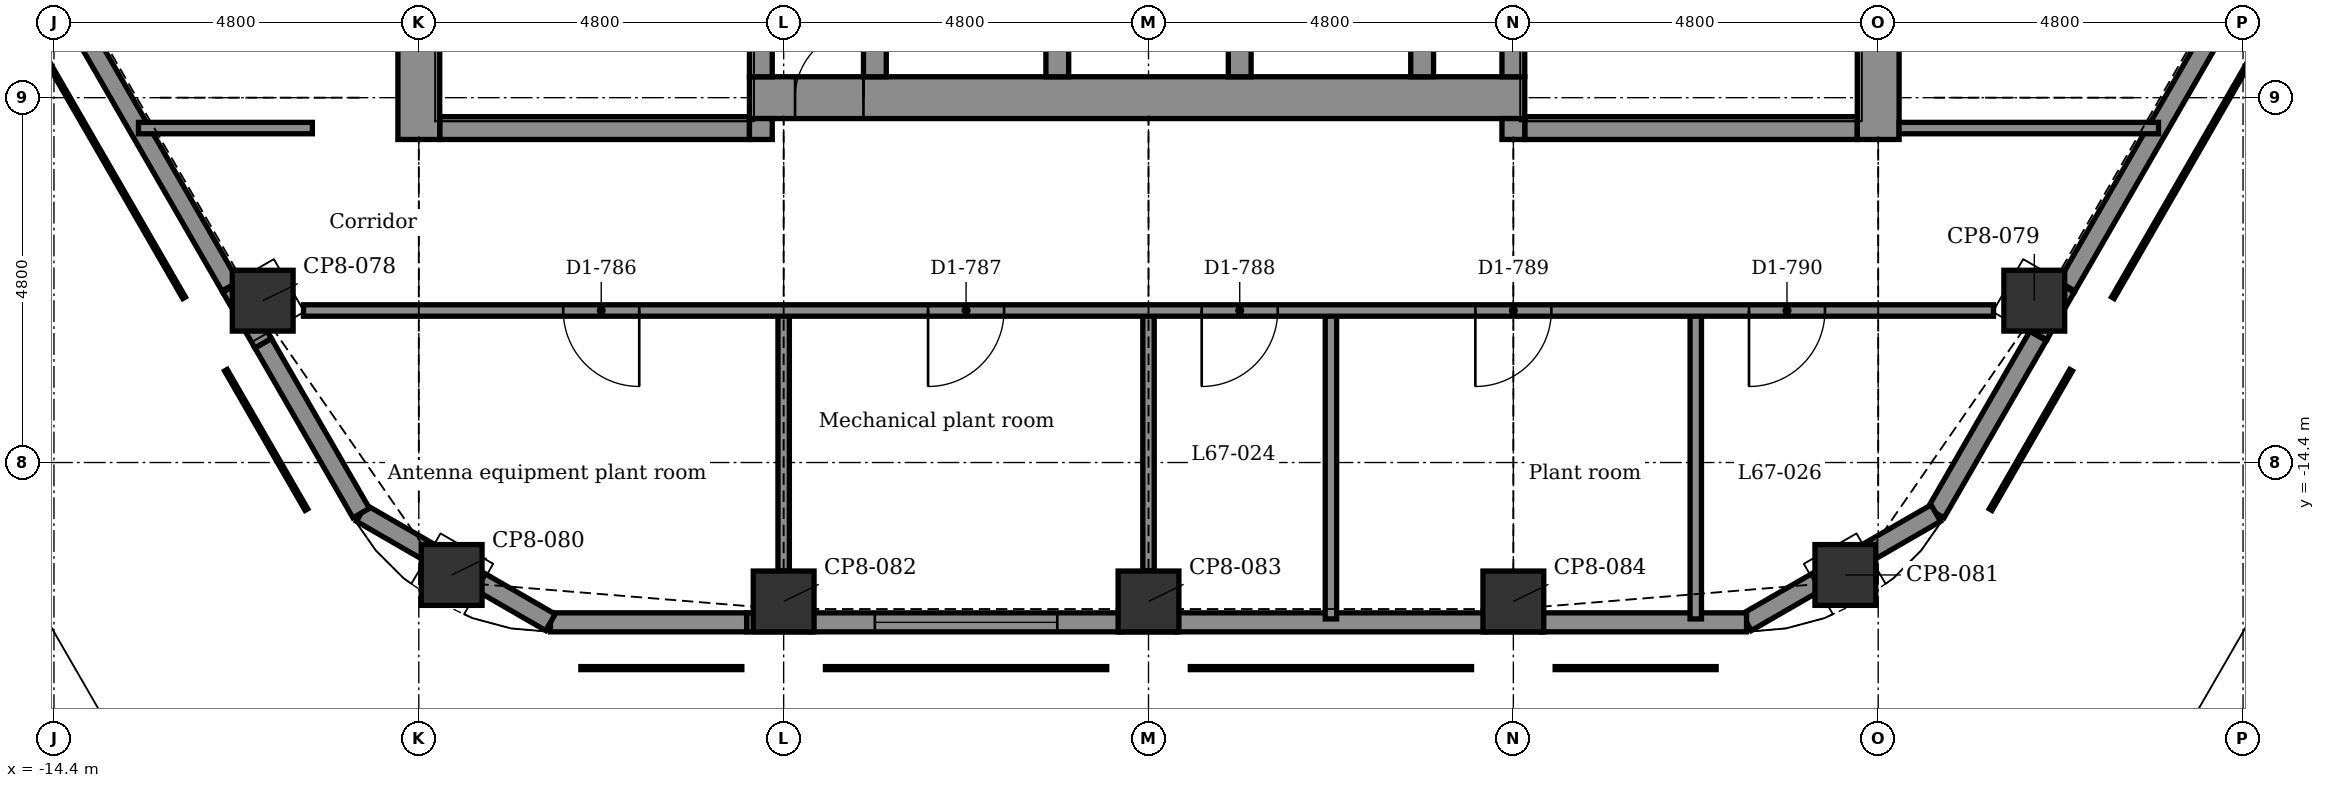
"""IFC4 building model, lengths in metres.
Left out: names, types, materials, properties, quantities, classifications, styles, units other than length and angle.
Written with IfcOpenShell. Run it as: python <this file> out.ifc"""

import sys

from ifc_helpers import new_model, si_unit, direction, frame, frame_2d, origin, origin_2d, place, context, subcontext, project, spatial, rectangle, extrude, element, fill, save


model = new_model("IFC4")
c1 = context("Model", 3, precision=1e-05, world=origin(), true_north=direction((0.0, 1.0)))
c2 = subcontext(c1, "Body", "Model", "MODEL_VIEW")
j1 = project(units=[si_unit("LENGTHUNIT", "METRE"), si_unit("PLANEANGLEUNIT", "RADIAN")], contexts=[c1])
p1 = place(None, origin())
s1 = spatial("IfcSite", under=j1, at=p1, CompositionType="ELEMENT")
p2 = place(p1, origin())
s2 = spatial("IfcBuilding", under=s1, at=p2, CompositionType="ELEMENT")
p3 = place(p2, frame((0.0, 0.0, 296.9)))
s3 = spatial("IfcBuildingStorey", under=s2, at=p3, CompositionType="ELEMENT", Elevation=296.9)
for number, where, z_axis, x_axis in (
    (1, (11.654, -12.271, -0.3), (0.0, 0.0, 1.0), (0.5, 0.866, 0.0)),
    (2, (9.168, -15.879, -0.3), (0.0, 0.0, 1.0), (0.866, 0.5, 0.0)),
    (3, (4.8, -16.228, -0.3), (0.0, 0.0, 1.0), (1.0, 0.0, 0.0)),
    (4, (0.0, -16.228, -0.3), (0.0, 0.0, 1.0), (1.0, 0.0, 0.0)),
    (5, (-4.8, -16.228, -0.3), (0.0, 0.0, 1.0), (1.0, 0.0, 0.0)),
    (6, (-9.168, -15.879, -0.3), (0.0, 0.0, 1.0), (0.5, 0.866, 0.0)),
    (7, (-11.654, -12.271, -0.3), (0.0, 0.0, 1.0), (0.866, 0.5, 0.0)),
):
    element("IfcColumn", number, at=place(p3, frame(where, z_axis=z_axis, x_axis=x_axis)), inside=s3, PredefinedType="COLUMN", context=c2, shape_type="SweptSolid", body=[
        extrude(rectangle(XDim=0.8, YDim=0.8, at=origin_2d()), origin(), (0.0, 0.0, 1.0), 5.0),
    ])
p4 = place(p3, frame((-9.325, -10.0, -0.3), z_axis=(0.0, 0.0, 1.0), x_axis=(1.0, 0.0, 0.0)))
e8 = element("IfcWall", 8, at=p4, inside=s3, PredefinedType="STANDARD", context=c2, shape_type="SweptSolid", body=[
    extrude(rectangle(XDim=4.075, YDim=0.3, at=frame_2d((2.038, 0.0))), origin(), (0.0, 0.0, 1.0), 5.0),
])
p5 = place(p3, frame((4.95, -10.0, -0.3), z_axis=(0.0, 0.0, 1.0), x_axis=(1.0, 0.0, 0.0)))
e9 = element("IfcWall", 9, at=p5, inside=s3, PredefinedType="STANDARD", context=c2, shape_type="SweptSolid", body=[
    extrude(rectangle(XDim=4.375, YDim=0.3, at=frame_2d((2.188, 0.0))), origin(), (0.0, 0.0, 1.0), 5.0),
])
p6 = place(p3, frame((-5.25, -9.6, -0.3), z_axis=(0.0, 0.0, 1.0), x_axis=(1.0, 0.0, 0.0)))
e10 = element("IfcWall", 10, at=p6, inside=s3, PredefinedType="SHEAR", context=c2, shape_type="SweptSolid", body=[
    extrude(rectangle(XDim=10.2, YDim=0.55, at=frame_2d((5.1, 0.0))), origin(), (0.0, 0.0, 1.0), 5.0),
])
p7 = place(p6, frame((0.6, 0.0, 0.3)))
e11 = element("IfcOpeningElement", 11, at=p7, cuts=e10, PredefinedType="OPENING", context=c2, shape_type="SweptSolid", body=[
    extrude(rectangle(XDim=0.9, YDim=2.1, at=frame_2d((0.45, 1.05))), frame((0.0, 0.285, 0.0), z_axis=(0.0, -1.0, 0.0), x_axis=(1.0, 0.0, 0.0)), (0.0, 0.0, 1.0), 0.57),
])
p8 = place(p3, frame((-9.6, -10.15, -0.3), z_axis=(0.0, 0.0, 1.0), x_axis=(0.0, 1.0, 0.0)))
e12 = element("IfcWall", 12, at=p8, inside=s3, PredefinedType="SHEAR", context=c2, shape_type="SweptSolid", body=[
    extrude(rectangle(XDim=7.6, YDim=0.55, at=frame_2d((3.8, 0.0))), origin(), (0.0, 0.0, 1.0), 5.0),
])
p9 = place(p3, frame((-5.1, -10.15, -0.3), z_axis=(0.0, 0.0, 1.0), x_axis=(0.0, 1.0, 0.0)))
e13 = element("IfcWall", 13, at=p9, inside=s3, PredefinedType="STANDARD", context=c2, shape_type="SweptSolid", body=[
    extrude(rectangle(XDim=0.275, YDim=0.3, at=frame_2d((0.137, 0.0))), origin(), (0.0, 0.0, 1.0), 5.0),
])
p10 = place(p3, frame((-5.1, -9.325, -0.3), z_axis=(0.0, 0.0, 1.0), x_axis=(0.0, 1.0, 0.0)))
e14 = element("IfcWall", 14, at=p10, inside=s3, PredefinedType="STANDARD", context=c2, shape_type="SweptSolid", body=[
    extrude(rectangle(XDim=7.075, YDim=0.3, at=frame_2d((3.538, 0.0))), origin(), (0.0, 0.0, 1.0), 5.0),
])
p11 = place(p10, frame((3.875, 0.0, 0.3)))
e15 = element("IfcOpeningElement", 15, at=p11, cuts=e14, PredefinedType="OPENING", context=c2, shape_type="SweptSolid", body=[
    extrude(rectangle(XDim=1.2, YDim=2.1, at=frame_2d((0.6, 1.05))), frame((0.0, 0.16, 0.0), z_axis=(0.0, -1.0, 0.0), x_axis=(1.0, 0.0, 0.0)), (0.0, 0.0, 1.0), 0.32),
])
for number, where, z_axis, x_axis in (
    (16, (-3.6, -9.325, -0.3), (0.0, 0.0, 1.0), (0.0, 1.0, 0.0)),
    (17, (-1.2, -9.325, -0.3), (0.0, 0.0, 1.0), (0.0, 1.0, 0.0)),
    (18, (1.2, -9.325, -0.3), (0.0, 0.0, 1.0), (0.0, 1.0, 0.0)),
    (19, (3.6, -9.325, -0.3), (0.0, 0.0, 1.0), (0.0, 1.0, 0.0)),
):
    element("IfcWall", number, at=place(p3, frame(where, z_axis=z_axis, x_axis=x_axis)), inside=s3, PredefinedType="STANDARD", context=c2, shape_type="SweptSolid", body=[
        extrude(rectangle(XDim=3.475, YDim=0.3, at=frame_2d((1.737, 0.0))), origin(), (0.0, 0.0, 1.0), 0.8),
    ])
p12 = place(p3, frame((4.8, -10.15, -0.3), z_axis=(0.0, 0.0, 1.0), x_axis=(0.0, 1.0, 0.0)))
e20 = element("IfcWall", 20, at=p12, inside=s3, PredefinedType="STANDARD", context=c2, shape_type="SweptSolid", body=[
    extrude(rectangle(XDim=0.275, YDim=0.3, at=frame_2d((0.137, 0.0))), origin(), (0.0, 0.0, 1.0), 5.0),
])
p13 = place(p3, frame((4.8, -9.325, -0.3), z_axis=(0.0, 0.0, 1.0), x_axis=(0.0, 1.0, 0.0)))
e21 = element("IfcWall", 21, at=p13, inside=s3, PredefinedType="STANDARD", context=c2, shape_type="SweptSolid", body=[
    extrude(rectangle(XDim=7.075, YDim=0.3, at=frame_2d((3.538, 0.0))), origin(), (0.0, 0.0, 1.0), 5.0),
])
p14 = place(p13, frame((3.875, 0.0, 0.3)))
e22 = element("IfcOpeningElement", 22, at=p14, cuts=e21, PredefinedType="OPENING", context=c2, shape_type="SweptSolid", body=[
    extrude(rectangle(XDim=1.2, YDim=2.1, at=frame_2d((0.6, 1.05))), frame((0.0, 0.16, 0.0), z_axis=(0.0, -1.0, 0.0), x_axis=(1.0, 0.0, 0.0)), (0.0, 0.0, 1.0), 0.32),
])
p15 = place(p3, frame((9.6, -10.15, -0.3), z_axis=(0.0, 0.0, 1.0), x_axis=(0.0, 1.0, 0.0)))
e23 = element("IfcWall", 23, at=p15, inside=s3, PredefinedType="SHEAR", context=c2, shape_type="SweptSolid", body=[
    extrude(rectangle(XDim=20.075, YDim=0.55, at=frame_2d((10.038, 0.0))), origin(), (0.0, 0.0, 1.0), 5.0),
])
p16 = place(p3, frame((14.112, -8.563, 0.0), z_axis=(0.0, 0.0, 1.0), x_axis=(-0.500026340207, -0.866010195725, 0.0)))
e24 = element("IfcWall", 24, at=p16, inside=s3, PredefinedType="SOLIDWALL", context=c2, shape_type="SweptSolid", body=[
    extrude(rectangle(XDim=4.08, YDim=0.25, at=frame_2d((2.04, 0.0))), origin(), (0.0, 0.0, 1.0), 3.8),
])
p17 = place(p3, frame((12.072, -12.096, 0.0), z_axis=(0.0, 0.0, 1.0), x_axis=(-0.499896944627, -0.866084894657, 0.0)))
e25 = element("IfcWall", 25, at=p17, inside=s3, PredefinedType="SOLIDWALL", context=c2, shape_type="SweptSolid", body=[
    extrude(rectangle(XDim=0.727, YDim=0.25, at=frame_2d((0.363, 0.0))), origin(), (0.0, 0.0, 1.0), 4.7),
])
p18 = place(p3, frame((11.708, -12.726, 0.0), z_axis=(0.0, 0.0, 1.0), x_axis=(-0.500056239725, -0.865992931329, 0.0)))
e26 = element("IfcWall", 26, at=p18, inside=s3, PredefinedType="SOLIDWALL", context=c2, shape_type="SweptSolid", body=[
    extrude(rectangle(XDim=2.701, YDim=0.25, at=frame_2d((1.351, 0.0))), origin(), (0.0, 0.0, 1.0), 3.8),
])
p19 = place(p3, frame((10.358, -15.065, 0.0), z_axis=(0.0, 0.0, 1.0), x_axis=(-0.866018712932, -0.500011588718, 0.0)))
e27 = element("IfcWall", 27, at=p19, inside=s3, PredefinedType="SOLIDWALL", context=c2, shape_type="SweptSolid", body=[
    extrude(rectangle(XDim=2.875, YDim=0.25, at=frame_2d((1.438, 0.0))), origin(), (0.0, 0.0, 1.0), 4.7),
])
p20 = place(p3, frame((-0.36, -16.503, 0.0), z_axis=(0.0, 0.0, 1.0), x_axis=(-1.0, 0.0, 0.0)))
e28 = element("IfcWall", 28, at=p20, inside=s3, PredefinedType="SOLIDWALL", context=c2, shape_type="SweptSolid", body=[
    extrude(rectangle(XDim=4.08, YDim=0.25, at=frame_2d((2.04, 0.0))), origin(), (0.0, 0.0, 1.0), 3.8),
])
p21 = place(p20, frame((0.84, 0.0, 0.6)))
e29 = element("IfcOpeningElement", 29, at=p21, cuts=e28, PredefinedType="OPENING", context=c2, shape_type="SweptSolid", body=[
    extrude(rectangle(XDim=2.4, YDim=3.0, at=frame_2d((1.2, 1.5))), frame((0.0, 0.135, 0.0), z_axis=(0.0, -1.0, 0.0), x_axis=(1.0, 0.0, 0.0)), (0.0, 0.0, 1.0), 0.27),
])
p22 = place(p3, frame((7.868, -16.503, 0.0), z_axis=(0.0, 0.0, 1.0), x_axis=(-1.0, 0.0, 0.0)))
e30 = element("IfcWall", 30, at=p22, inside=s3, PredefinedType="SOLIDWALL", context=c2, shape_type="SweptSolid", body=[
    extrude(rectangle(XDim=2.701, YDim=0.25, at=frame_2d((1.351, 0.0))), origin(), (0.0, 0.0, 1.0), 3.8),
])
p23 = place(p3, frame((5.167, -16.503, 0.0), z_axis=(0.0, 0.0, 1.0), x_axis=(-1.0, 0.0, 0.0)))
e31 = element("IfcWall", 31, at=p23, inside=s3, PredefinedType="SOLIDWALL", context=c2, shape_type="SweptSolid", body=[
    extrude(rectangle(XDim=0.727, YDim=0.25, at=frame_2d((0.363, 0.0))), origin(), (0.0, 0.0, 1.0), 4.7),
])
p24 = place(p3, frame((4.44, -16.503, 0.0), z_axis=(0.0, 0.0, 1.0), x_axis=(-1.0, 0.0, 0.0)))
e32 = element("IfcWall", 32, at=p24, inside=s3, PredefinedType="SOLIDWALL", context=c2, shape_type="SweptSolid", body=[
    extrude(rectangle(XDim=4.08, YDim=0.25, at=frame_2d((2.04, 0.0))), origin(), (0.0, 0.0, 1.0), 3.8),
])
p25 = place(p3, frame((0.36, -16.503, 0.0), z_axis=(0.0, 0.0, 1.0), x_axis=(-1.0, 0.0, 0.0)))
e33 = element("IfcWall", 33, at=p25, inside=s3, PredefinedType="SOLIDWALL", context=c2, shape_type="SweptSolid", body=[
    extrude(rectangle(XDim=0.72, YDim=0.25, at=frame_2d((0.36, 0.0))), origin(), (0.0, 0.0, 1.0), 4.7),
])
p26 = place(p3, frame((-4.44, -16.503, 0.0), z_axis=(0.0, 0.0, 1.0), x_axis=(-1.0, 0.0, 0.0)))
e34 = element("IfcWall", 34, at=p26, inside=s3, PredefinedType="SOLIDWALL", context=c2, shape_type="SweptSolid", body=[
    extrude(rectangle(XDim=0.847, YDim=0.25, at=frame_2d((0.424, 0.0))), origin(), (0.0, 0.0, 1.0), 4.7),
])
p27 = place(p3, frame((-5.287, -16.503, 0.0), z_axis=(0.0, 0.0, 1.0), x_axis=(-1.0, 0.0, 0.0)))
e35 = element("IfcWall", 35, at=p27, inside=s3, PredefinedType="SOLIDWALL", context=c2, shape_type="SweptSolid", body=[
    extrude(rectangle(XDim=2.581, YDim=0.25, at=frame_2d((1.291, 0.0))), origin(), (0.0, 0.0, 1.0), 3.8),
])
p28 = place(p3, frame((-7.868, -16.503, 0.0), z_axis=(0.0, 0.0, 1.0), x_axis=(-0.866018712932, 0.500011588718, 0.0)))
e36 = element("IfcWall", 36, at=p28, inside=s3, PredefinedType="SOLIDWALL", context=c2, shape_type="SweptSolid", body=[
    extrude(rectangle(XDim=2.875, YDim=0.25, at=frame_2d((1.438, 0.0))), origin(), (0.0, 0.0, 1.0), 4.7),
])
p29 = place(p3, frame((-10.358, -15.065, 0.0), z_axis=(0.0, 0.0, 1.0), x_axis=(-0.500025418611, 0.866010727845, 0.0)))
e37 = element("IfcWall", 37, at=p29, inside=s3, PredefinedType="SOLIDWALL", context=c2, shape_type="SweptSolid", body=[
    extrude(rectangle(XDim=2.581, YDim=0.25, at=frame_2d((1.291, 0.0))), origin(), (0.0, 0.0, 1.0), 3.8),
])
p30 = place(p3, frame((-11.648, -12.83, 0.0), z_axis=(0.0, 0.0, 1.0), x_axis=(-0.500013496215, 0.866017611601, 0.0)))
e38 = element("IfcWall", 38, at=p30, inside=s3, PredefinedType="SOLIDWALL", context=c2, shape_type="SweptSolid", body=[
    extrude(rectangle(XDim=0.847, YDim=0.25, at=frame_2d((0.424, 0.0))), origin(), (0.0, 0.0, 1.0), 4.7),
])
p31 = place(p3, frame((-12.072, -12.096, 0.0), z_axis=(0.0, 0.0, 1.0), x_axis=(-0.500026340207, 0.866010195725, 0.0)))
e39 = element("IfcWall", 39, at=p31, inside=s3, PredefinedType="SOLIDWALL", context=c2, shape_type="SweptSolid", body=[
    extrude(rectangle(XDim=4.08, YDim=0.25, at=frame_2d((2.04, 0.0))), origin(), (0.0, 0.0, 1.0), 3.8),
])
for number, where, z_axis, x_axis in (
    (40, (7.2, -16.458, 0.0), (0.0, 0.0, 1.0), (0.0, 1.0, 0.0)),
    (41, (2.4, -16.458, 0.0), (0.0, 0.0, 1.0), (0.0, 1.0, 0.0)),
):
    element("IfcWall", number, at=place(p3, frame(where, z_axis=z_axis, x_axis=x_axis)), inside=s3, PredefinedType="PARTITIONING", context=c2, shape_type="SweptSolid", body=[
        extrude(rectangle(XDim=4.058, YDim=0.15, at=frame_2d((2.029, 0.0))), origin(), (0.0, 0.0, 1.0), 4.7),
    ])
for number, where, z_axis, x_axis in (
    (42, (0.0, -15.828, 0.0), (0.0, 0.0, 1.0), (0.0, 1.0, 0.0)),
    (43, (-4.8, -15.828, 0.0), (0.0, 0.0, 1.0), (0.0, 1.0, 0.0)),
):
    element("IfcWall", number, at=place(p3, frame(where, z_axis=z_axis, x_axis=x_axis)), inside=s3, PredefinedType="PARTITIONING", context=c2, shape_type="SweptSolid", body=[
        extrude(rectangle(XDim=3.428, YDim=0.15, at=frame_2d((1.714, 0.0))), origin(), (0.0, 0.0, 1.0), 4.39),
    ])
p32 = place(p3, frame((-11.117, -12.4, 0.0), z_axis=(0.0, 0.0, 1.0), x_axis=(1.0, 0.0, 0.0)))
e44 = element("IfcWall", 44, at=p32, inside=s3, PredefinedType="PARTITIONING", context=c2, shape_type="SweptSolid", body=[
    extrude(rectangle(XDim=22.234, YDim=0.15, at=frame_2d((11.117, 0.0))), origin(), (0.0, 0.0, 1.0), 4.7),
])
p33 = place(p32, frame((3.417, 0.0, 0.0)))
e45 = element("IfcOpeningElement", 45, at=p33, cuts=e44, PredefinedType="OPENING", context=c2, shape_type="SweptSolid", body=[
    extrude(rectangle(XDim=1.0, YDim=2.1, at=frame_2d((0.5, 1.05))), frame((0.0, 0.085, 0.0), z_axis=(0.0, -1.0, 0.0), x_axis=(1.0, 0.0, 0.0)), (0.0, 0.0, 1.0), 0.17),
])
p34 = place(p32, frame((8.217, 0.0, 0.0)))
e46 = element("IfcOpeningElement", 46, at=p34, cuts=e44, PredefinedType="OPENING", context=c2, shape_type="SweptSolid", body=[
    extrude(rectangle(XDim=1.0, YDim=2.1, at=frame_2d((0.5, 1.05))), frame((0.0, 0.085, 0.0), z_axis=(0.0, -1.0, 0.0), x_axis=(1.0, 0.0, 0.0)), (0.0, 0.0, 1.0), 0.17),
])
p35 = place(p32, frame((11.817, 0.0, 0.0)))
e47 = element("IfcOpeningElement", 47, at=p35, cuts=e44, PredefinedType="OPENING", context=c2, shape_type="SweptSolid", body=[
    extrude(rectangle(XDim=1.0, YDim=2.1, at=frame_2d((0.5, 1.05))), frame((0.0, 0.085, 0.0), z_axis=(0.0, -1.0, 0.0), x_axis=(1.0, 0.0, 0.0)), (0.0, 0.0, 1.0), 0.17),
])
p36 = place(p32, frame((15.417, 0.0, 0.0)))
e48 = element("IfcOpeningElement", 48, at=p36, cuts=e44, PredefinedType="OPENING", context=c2, shape_type="SweptSolid", body=[
    extrude(rectangle(XDim=1.0, YDim=2.1, at=frame_2d((0.5, 1.05))), frame((0.0, 0.085, 0.0), z_axis=(0.0, -1.0, 0.0), x_axis=(1.0, 0.0, 0.0)), (0.0, 0.0, 1.0), 0.17),
])
p37 = place(p32, frame((19.017, 0.0, 0.0)))
e49 = element("IfcOpeningElement", 49, at=p37, cuts=e44, PredefinedType="OPENING", context=c2, shape_type="SweptSolid", body=[
    extrude(rectangle(XDim=1.0, YDim=2.1, at=frame_2d((0.5, 1.05))), frame((0.0, 0.085, 0.0), z_axis=(0.0, -1.0, 0.0), x_axis=(1.0, 0.0, 0.0)), (0.0, 0.0, 1.0), 0.17),
])
p38 = place(p3, frame((-13.288, -10.0, 0.0), z_axis=(0.0, 0.0, 1.0), x_axis=(1.0, 0.0, 0.0)))
e50 = element("IfcWall", 50, at=p38, inside=s3, PredefinedType="PARTITIONING", context=c2, shape_type="SweptSolid", body=[
    extrude(rectangle(XDim=2.288, YDim=0.15, at=frame_2d((1.144, 0.0))), origin(), (0.0, 0.0, 1.0), 4.7),
])
p39 = place(p3, frame((9.875, -10.0, 0.0), z_axis=(0.0, 0.0, 1.0), x_axis=(1.0, 0.0, 0.0)))
e51 = element("IfcWall", 51, at=p39, inside=s3, PredefinedType="PARTITIONING", context=c2, shape_type="SweptSolid", body=[
    extrude(rectangle(XDim=3.413, YDim=0.15, at=frame_2d((1.707, 0.0))), origin(), (0.0, 0.0, 1.0), 4.7),
])
p40 = place(p33, frame((1.0, 0.0, 0.0), z_axis=(0.0, 0.0, 1.0), x_axis=(-1.0, 0.0, 0.0)))
e52 = element("IfcDoor", 52, at=p40, inside=s3, OperationType="SINGLE_SWING_RIGHT", PredefinedType="DOOR", context=c2, shape_type="SweptSolid", body=[
    extrude(rectangle(XDim=1.0, YDim=2.1, at=frame_2d((0.5, 1.05))), frame((0.0, 0.025, 0.0), z_axis=(0.0, -1.0, 0.0), x_axis=(1.0, 0.0, 0.0)), (0.0, 0.0, 1.0), 0.05),
])
fill(e45, e52)
p41 = place(p34, frame((1.0, 0.0, 0.0), z_axis=(0.0, 0.0, 1.0), x_axis=(-1.0, 0.0, 0.0)))
e53 = element("IfcDoor", 53, at=p41, inside=s3, OperationType="SINGLE_SWING_LEFT", PredefinedType="DOOR", context=c2, shape_type="SweptSolid", body=[
    extrude(rectangle(XDim=1.0, YDim=2.1, at=frame_2d((0.5, 1.05))), frame((0.0, 0.025, 0.0), z_axis=(0.0, -1.0, 0.0), x_axis=(1.0, 0.0, 0.0)), (0.0, 0.0, 1.0), 0.05),
])
fill(e46, e53)
p42 = place(p35, frame((1.0, 0.0, 0.0), z_axis=(0.0, 0.0, 1.0), x_axis=(-1.0, 0.0, 0.0)))
e54 = element("IfcDoor", 54, at=p42, inside=s3, OperationType="SINGLE_SWING_LEFT", PredefinedType="DOOR", context=c2, shape_type="SweptSolid", body=[
    extrude(rectangle(XDim=1.0, YDim=2.1, at=frame_2d((0.5, 1.05))), frame((0.0, 0.025, 0.0), z_axis=(0.0, -1.0, 0.0), x_axis=(1.0, 0.0, 0.0)), (0.0, 0.0, 1.0), 0.05),
])
fill(e47, e54)
p43 = place(p36, frame((1.0, 0.0, 0.0), z_axis=(0.0, 0.0, 1.0), x_axis=(-1.0, 0.0, 0.0)))
e55 = element("IfcDoor", 55, at=p43, inside=s3, OperationType="SINGLE_SWING_LEFT", PredefinedType="DOOR", context=c2, shape_type="SweptSolid", body=[
    extrude(rectangle(XDim=1.0, YDim=2.1, at=frame_2d((0.5, 1.05))), frame((0.0, 0.025, 0.0), z_axis=(0.0, -1.0, 0.0), x_axis=(1.0, 0.0, 0.0)), (0.0, 0.0, 1.0), 0.05),
])
fill(e48, e55)
p44 = place(p37, frame((1.0, 0.0, 0.0), z_axis=(0.0, 0.0, 1.0), x_axis=(-1.0, 0.0, 0.0)))
e56 = element("IfcDoor", 56, at=p44, inside=s3, OperationType="SINGLE_SWING_LEFT", PredefinedType="DOOR", context=c2, shape_type="SweptSolid", body=[
    extrude(rectangle(XDim=1.0, YDim=2.1, at=frame_2d((0.5, 1.05))), frame((0.0, 0.025, 0.0), z_axis=(0.0, -1.0, 0.0), x_axis=(1.0, 0.0, 0.0)), (0.0, 0.0, 1.0), 0.05),
])
fill(e49, e56)
p45 = place(p7, origin())
e57 = element("IfcDoor", 57, at=p45, inside=s3, OperationType="SINGLE_SWING_RIGHT", PredefinedType="DOOR", context=c2, shape_type="SweptSolid", body=[
    extrude(rectangle(XDim=0.9, YDim=2.1, at=frame_2d((0.45, 1.05))), frame((0.0, 0.025, 0.0), z_axis=(0.0, -1.0, 0.0), x_axis=(1.0, 0.0, 0.0)), (0.0, 0.0, 1.0), 0.05),
])
fill(e11, e57)
p46 = place(p21, origin())
e58 = element("IfcWindow", 58, at=p46, inside=s3, PartitioningType="SINGLE_PANEL", PredefinedType="WINDOW", context=c2, shape_type="SweptSolid", body=[
    extrude(rectangle(XDim=2.4, YDim=3.0, at=frame_2d((1.2, 1.5))), frame((0.0, 0.03, 0.0), z_axis=(0.0, -1.0, 0.0), x_axis=(1.0, 0.0, 0.0)), (0.0, 0.0, 1.0), 0.06),
])
fill(e29, e58)
save(model, sys.argv[1])
